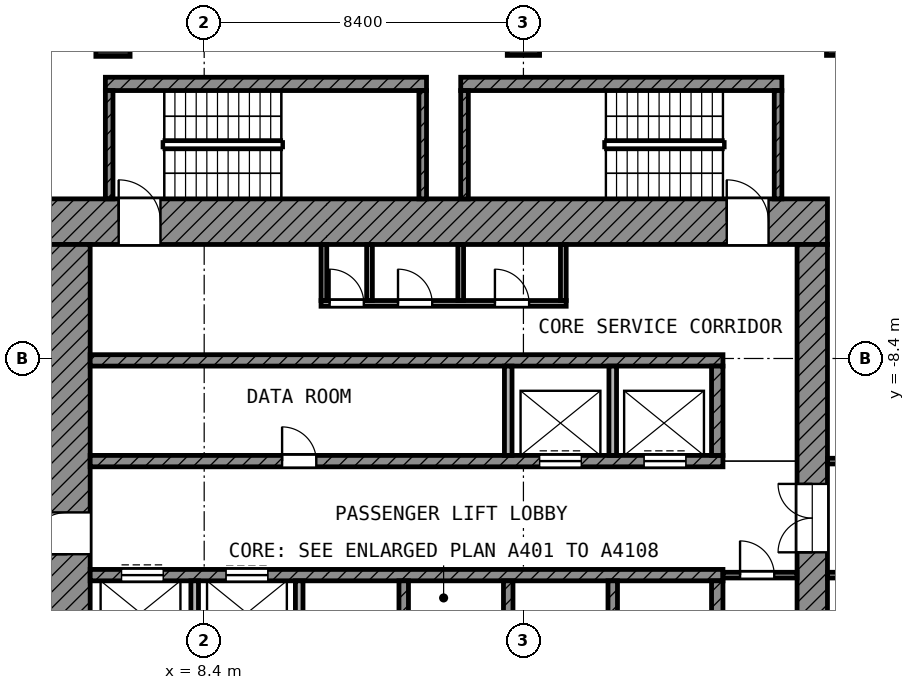
"""IFC4 building model, lengths in metres.
Left out: names, types, materials, properties, quantities, classifications, styles, units other than length and angle.
Written with IfcOpenShell. Run it as: python <this file> out.ifc"""

import sys

from ifc_helpers import new_model, si_unit, direction, frame, frame_2d, origin, origin_2d, place, context, subcontext, project, spatial, rectangle, extrude, element, fill, save


model = new_model("IFC4")
c1 = context("Model", 3, precision=1e-05, world=origin(), true_north=direction((0.0, 1.0)))
c2 = subcontext(c1, "Body", "Model", "MODEL_VIEW")
j1 = project(units=[si_unit("LENGTHUNIT", "METRE"), si_unit("PLANEANGLEUNIT", "RADIAN")], contexts=[c1])
p1 = place(None, origin())
s1 = spatial("IfcSite", under=j1, at=p1, CompositionType="ELEMENT")
p2 = place(p1, origin())
s2 = spatial("IfcBuilding", under=s1, at=p2, CompositionType="ELEMENT")
p3 = place(p2, frame((0.0, 0.0, 264.2)))
s3 = spatial("IfcBuildingStorey", under=s2, at=p3, CompositionType="ELEMENT", Elevation=264.2)
p4 = place(p3, frame((6.0, 0.0, 0.0), z_axis=(0.0, 0.0, 1.0), x_axis=(1.0, 0.0, 0.0)))
e1 = element("IfcColumn", 1, at=p4, inside=s3, PredefinedType="COLUMN", context=c2, shape_type="SweptSolid", body=[
    extrude(rectangle(XDim=0.9, YDim=0.9, at=origin_2d()), origin(), (0.0, 0.0, 1.0), 4.2),
])
for number, where, z_axis, x_axis in (
    (2, (16.8, 0.0, 0.0), (0.0, 0.0, 1.0), (1.0, 0.0, 0.0)),
    (3, (25.2, 0.0, 0.0), (0.0, 0.0, 1.0), (1.0, 0.0, 0.0)),
):
    element("IfcColumn", number, at=place(p3, frame(where, z_axis=z_axis, x_axis=x_axis)), inside=s3, PredefinedType="COLUMN", context=c2, shape_type="SweptSolid", body=[
        extrude(rectangle(XDim=0.85, YDim=0.85, at=origin_2d()), origin(), (0.0, 0.0, 1.0), 4.2),
    ])
p5 = place(p3, frame((4.2, -4.8, 0.0), z_axis=(0.0, 0.0, 1.0), x_axis=(1.0, 0.0, 0.0)))
e4 = element("IfcWall", 4, at=p5, inside=s3, PredefinedType="SHEAR", context=c2, shape_type="SweptSolid", body=[
    extrude(rectangle(XDim=20.6, YDim=1.2, at=frame_2d((10.3, 0.0))), origin(), (0.0, 0.0, 1.0), 3.6),
])
p6 = place(p5, frame((1.95, 0.0, 0.0)))
e5 = element("IfcOpeningElement", 5, at=p6, cuts=e4, PredefinedType="OPENING", context=c2, shape_type="SweptSolid", body=[
    extrude(rectangle(XDim=1.1, YDim=2.1, at=frame_2d((0.55, 1.05))), frame((0.0, 0.61, 0.0), z_axis=(0.0, -1.0, 0.0), x_axis=(1.0, 0.0, 0.0)), (0.0, 0.0, 1.0), 1.22),
])
p7 = place(p5, frame((17.95, 0.0, 0.0)))
e6 = element("IfcOpeningElement", 6, at=p7, cuts=e4, PredefinedType="OPENING", context=c2, shape_type="SweptSolid", body=[
    extrude(rectangle(XDim=1.1, YDim=2.1, at=frame_2d((0.55, 1.05))), frame((0.0, 0.61, 0.0), z_axis=(0.0, -1.0, 0.0), x_axis=(1.0, 0.0, 0.0)), (0.0, 0.0, 1.0), 1.22),
])
p8 = place(p3, frame((4.8, -24.8, 0.0), z_axis=(0.0, 0.0, 1.0), x_axis=(0.0, 1.0, 0.0)))
e7 = element("IfcWall", 7, at=p8, inside=s3, PredefinedType="SHEAR", context=c2, shape_type="SweptSolid", body=[
    extrude(rectangle(XDim=19.4, YDim=1.2, at=frame_2d((9.7, 0.0))), origin(), (0.0, 0.0, 1.0), 3.6),
])
p9 = place(p8, frame((11.25, 0.0, 0.0)))
e8 = element("IfcOpeningElement", 8, at=p9, cuts=e7, PredefinedType="OPENING", context=c2, shape_type="SweptSolid", body=[
    extrude(rectangle(XDim=1.1, YDim=2.1, at=frame_2d((0.55, 1.05))), frame((0.0, 0.61, 0.0), z_axis=(0.0, -1.0, 0.0), x_axis=(1.0, 0.0, 0.0)), (0.0, 0.0, 1.0), 1.22),
])
p10 = place(p8, frame((1.95, 0.0, 0.0)))
e9 = element("IfcOpeningElement", 9, at=p10, cuts=e7, PredefinedType="OPENING", context=c2, shape_type="SweptSolid", body=[
    extrude(rectangle(XDim=1.1, YDim=2.1, at=frame_2d((0.55, 1.05))), frame((0.0, 0.61, 0.0), z_axis=(0.0, -1.0, 0.0), x_axis=(1.0, 0.0, 0.0)), (0.0, 0.0, 1.0), 1.22),
])
p11 = place(p3, frame((24.4, -24.0, 0.0), z_axis=(0.0, 0.0, 1.0), x_axis=(0.0, 1.0, 0.0)))
e10 = element("IfcWall", 10, at=p11, inside=s3, PredefinedType="SHEAR", context=c2, shape_type="SweptSolid", body=[
    extrude(rectangle(XDim=18.6, YDim=0.8, at=frame_2d((9.3, 0.0))), origin(), (0.0, 0.0, 1.0), 3.6),
])
p12 = place(p11, frame((10.5, 0.0, 0.0)))
e11 = element("IfcOpeningElement", 11, at=p12, cuts=e10, PredefinedType="OPENING", context=c2, shape_type="SweptSolid", body=[
    extrude(rectangle(XDim=1.8, YDim=2.1, at=frame_2d((0.9, 1.05))), frame((0.0, 0.41, 0.0), z_axis=(0.0, -1.0, 0.0), x_axis=(1.0, 0.0, 0.0)), (0.0, 0.0, 1.0), 0.82),
])
p13 = place(p3, frame((5.4, -8.45, 0.0), z_axis=(0.0, 0.0, 1.0), x_axis=(1.0, 0.0, 0.0)))
e12 = element("IfcWall", 12, at=p13, inside=s3, PredefinedType="SHEAR", context=c2, shape_type="SweptSolid", body=[
    extrude(rectangle(XDim=16.65, YDim=0.3, at=frame_2d((8.325, 0.0))), origin(), (0.0, 0.0, 1.0), 3.6),
])
p14 = place(p3, frame((5.4, -11.1, 0.0), z_axis=(0.0, 0.0, 1.0), x_axis=(1.0, 0.0, 0.0)))
e13 = element("IfcWall", 13, at=p14, inside=s3, PredefinedType="SHEAR", context=c2, shape_type="SweptSolid", body=[
    extrude(rectangle(XDim=16.65, YDim=0.3, at=frame_2d((8.325, 0.0))), origin(), (0.0, 0.0, 1.0), 3.6),
])
p15 = place(p14, frame((11.825, 0.0, 0.0)))
e14 = element("IfcOpeningElement", 14, at=p15, cuts=e13, PredefinedType="OPENING", context=c2, shape_type="SweptSolid", body=[
    extrude(rectangle(XDim=1.1, YDim=2.1, at=frame_2d((0.55, 1.05))), frame((0.0, 0.16, 0.0), z_axis=(0.0, -1.0, 0.0), x_axis=(1.0, 0.0, 0.0)), (0.0, 0.0, 1.0), 0.32),
])
p16 = place(p14, frame((14.575, 0.0, 0.0)))
e15 = element("IfcOpeningElement", 15, at=p16, cuts=e13, PredefinedType="OPENING", context=c2, shape_type="SweptSolid", body=[
    extrude(rectangle(XDim=1.1, YDim=2.1, at=frame_2d((0.55, 1.05))), frame((0.0, 0.16, 0.0), z_axis=(0.0, -1.0, 0.0), x_axis=(1.0, 0.0, 0.0)), (0.0, 0.0, 1.0), 0.32),
])
p17 = place(p14, frame((5.05, 0.0, 0.0)))
e16 = element("IfcOpeningElement", 16, at=p17, cuts=e13, PredefinedType="OPENING", context=c2, shape_type="SweptSolid", body=[
    extrude(rectangle(XDim=0.9, YDim=2.1, at=frame_2d((0.45, 1.05))), frame((0.0, 0.16, 0.0), z_axis=(0.0, -1.0, 0.0), x_axis=(1.0, 0.0, 0.0)), (0.0, 0.0, 1.0), 0.32),
])
p18 = place(p3, frame((5.4, -14.1, 0.0), z_axis=(0.0, 0.0, 1.0), x_axis=(1.0, 0.0, 0.0)))
e17 = element("IfcWall", 17, at=p18, inside=s3, PredefinedType="SHEAR", context=c2, shape_type="SweptSolid", body=[
    extrude(rectangle(XDim=16.65, YDim=0.3, at=frame_2d((8.325, 0.0))), origin(), (0.0, 0.0, 1.0), 3.6),
])
p19 = place(p18, frame((0.825, 0.0, 0.0)))
e18 = element("IfcOpeningElement", 18, at=p19, cuts=e17, PredefinedType="OPENING", context=c2, shape_type="SweptSolid", body=[
    extrude(rectangle(XDim=1.1, YDim=2.1, at=frame_2d((0.55, 1.05))), frame((0.0, 0.16, 0.0), z_axis=(0.0, -1.0, 0.0), x_axis=(1.0, 0.0, 0.0)), (0.0, 0.0, 1.0), 0.32),
])
p20 = place(p18, frame((3.575, 0.0, 0.0)))
e19 = element("IfcOpeningElement", 19, at=p20, cuts=e17, PredefinedType="OPENING", context=c2, shape_type="SweptSolid", body=[
    extrude(rectangle(XDim=1.1, YDim=2.1, at=frame_2d((0.55, 1.05))), frame((0.0, 0.16, 0.0), z_axis=(0.0, -1.0, 0.0), x_axis=(1.0, 0.0, 0.0)), (0.0, 0.0, 1.0), 0.32),
])
p21 = place(p3, frame((21.9, -10.95, 0.0), z_axis=(0.0, 0.0, 1.0), x_axis=(0.0, 1.0, 0.0)))
e20 = element("IfcWall", 20, at=p21, inside=s3, PredefinedType="SHEAR", context=c2, shape_type="SweptSolid", body=[
    extrude(rectangle(XDim=2.35, YDim=0.3, at=frame_2d((1.175, 0.0))), origin(), (0.0, 0.0, 1.0), 3.6),
])
p22 = place(p3, frame((21.9, -16.6, 0.0), z_axis=(0.0, 0.0, 1.0), x_axis=(0.0, 1.0, 0.0)))
e21 = element("IfcWall", 21, at=p22, inside=s3, PredefinedType="SHEAR", context=c2, shape_type="SweptSolid", body=[
    extrude(rectangle(XDim=2.35, YDim=0.3, at=frame_2d((1.175, 0.0))), origin(), (0.0, 0.0, 1.0), 3.6),
])
for number, where, z_axis, x_axis in (
    (22, (16.4, -10.95, 0.0), (0.0, 0.0, 1.0), (0.0, 1.0, 0.0)),
    (23, (19.15, -10.95, 0.0), (0.0, 0.0, 1.0), (0.0, 1.0, 0.0)),
):
    element("IfcWall", number, at=place(p3, frame(where, z_axis=z_axis, x_axis=x_axis)), inside=s3, PredefinedType="PARTITIONING", context=c2, shape_type="SweptSolid", body=[
        extrude(rectangle(XDim=2.35, YDim=0.2, at=frame_2d((1.175, 0.0))), origin(), (0.0, 0.0, 1.0), 3.6),
    ])
for number, where, z_axis, x_axis in (
    (24, (8.15, -16.6, 0.0), (0.0, 0.0, 1.0), (0.0, 1.0, 0.0)),
    (25, (10.9, -16.6, 0.0), (0.0, 0.0, 1.0), (0.0, 1.0, 0.0)),
):
    element("IfcWall", number, at=place(p3, frame(where, z_axis=z_axis, x_axis=x_axis)), inside=s3, PredefinedType="PARTITIONING", context=c2, shape_type="SweptSolid", body=[
        extrude(rectangle(XDim=2.35, YDim=0.2, at=frame_2d((1.175, 0.0))), origin(), (0.0, 0.0, 1.0), 3.6),
    ])
for number, where, z_axis, x_axis in (
    (26, (13.65, -16.6, 0.0), (0.0, 0.0, 1.0), (0.0, 1.0, 0.0)),
    (27, (16.4, -16.6, 0.0), (0.0, 0.0, 1.0), (0.0, 1.0, 0.0)),
    (28, (19.15, -16.6, 0.0), (0.0, 0.0, 1.0), (0.0, 1.0, 0.0)),
):
    element("IfcWall", number, at=place(p3, frame(where, z_axis=z_axis, x_axis=x_axis)), inside=s3, PredefinedType="SHEAR", context=c2, shape_type="SweptSolid", body=[
        extrude(rectangle(XDim=2.35, YDim=0.25, at=frame_2d((1.175, 0.0))), origin(), (0.0, 0.0, 1.0), 3.6),
    ])
p23 = place(p3, frame((22.05, -14.1, 0.0), z_axis=(0.0, 0.0, 1.0), x_axis=(1.0, 0.0, 0.0)))
e29 = element("IfcWall", 29, at=p23, inside=s3, PredefinedType="PARTITIONING", context=c2, shape_type="SweptSolid", body=[
    extrude(rectangle(XDim=1.95, YDim=0.15, at=frame_2d((0.975, 0.0))), origin(), (0.0, 0.0, 1.0), 3.6),
])
p24 = place(p23, frame((0.45, 0.0, 0.0)))
e30 = element("IfcOpeningElement", 30, at=p24, cuts=e29, PredefinedType="OPENING", context=c2, shape_type="SweptSolid", body=[
    extrude(rectangle(XDim=0.9, YDim=2.1, at=frame_2d((0.45, 1.05))), frame((0.0, 0.085, 0.0), z_axis=(0.0, -1.0, 0.0), x_axis=(1.0, 0.0, 0.0)), (0.0, 0.0, 1.0), 0.17),
])
p25 = place(p3, frame((11.475, -6.95, 0.0), z_axis=(0.0, 0.0, 1.0), x_axis=(1.0, 0.0, 0.0)))
e31 = element("IfcWall", 31, at=p25, inside=s3, PredefinedType="PARTITIONING", context=c2, shape_type="SweptSolid", body=[
    extrude(rectangle(XDim=6.45, YDim=0.15, at=frame_2d((3.225, 0.0))), origin(), (0.0, 0.0, 1.0), 3.6),
])
p26 = place(p25, frame((0.225, 0.0, 0.0)))
e32 = element("IfcOpeningElement", 32, at=p26, cuts=e31, PredefinedType="OPENING", context=c2, shape_type="SweptSolid", body=[
    extrude(rectangle(XDim=0.9, YDim=2.1, at=frame_2d((0.45, 1.05))), frame((0.0, 0.085, 0.0), z_axis=(0.0, -1.0, 0.0), x_axis=(1.0, 0.0, 0.0)), (0.0, 0.0, 1.0), 0.17),
])
p27 = place(p25, frame((2.025, 0.0, 0.0)))
e33 = element("IfcOpeningElement", 33, at=p27, cuts=e31, PredefinedType="OPENING", context=c2, shape_type="SweptSolid", body=[
    extrude(rectangle(XDim=0.9, YDim=2.1, at=frame_2d((0.45, 1.05))), frame((0.0, 0.085, 0.0), z_axis=(0.0, -1.0, 0.0), x_axis=(1.0, 0.0, 0.0)), (0.0, 0.0, 1.0), 0.17),
])
p28 = place(p25, frame((4.575, 0.0, 0.0)))
e34 = element("IfcOpeningElement", 34, at=p28, cuts=e31, PredefinedType="OPENING", context=c2, shape_type="SweptSolid", body=[
    extrude(rectangle(XDim=0.9, YDim=2.1, at=frame_2d((0.45, 1.05))), frame((0.0, 0.085, 0.0), z_axis=(0.0, -1.0, 0.0), x_axis=(1.0, 0.0, 0.0)), (0.0, 0.0, 1.0), 0.17),
])
for number, where, z_axis, x_axis in (
    (35, (11.55, -6.875, 0.0), (0.0, 0.0, 1.0), (0.0, 1.0, 0.0)),
    (36, (12.75, -6.875, 0.0), (0.0, 0.0, 1.0), (0.0, 1.0, 0.0)),
    (37, (15.15, -6.875, 0.0), (0.0, 0.0, 1.0), (0.0, 1.0, 0.0)),
    (38, (17.85, -6.875, 0.0), (0.0, 0.0, 1.0), (0.0, 1.0, 0.0)),
):
    element("IfcWall", number, at=place(p3, frame(where, z_axis=z_axis, x_axis=x_axis)), inside=s3, PredefinedType="PARTITIONING", context=c2, shape_type="SweptSolid", body=[
        extrude(rectangle(XDim=1.475, YDim=0.15, at=frame_2d((0.738, 0.0))), origin(), (0.0, 0.0, 1.0), 3.6),
    ])
p29 = place(p3, frame((5.8, -1.175, 0.0), z_axis=(0.0, 0.0, 1.0), x_axis=(1.0, 0.0, 0.0)))
e39 = element("IfcWall", 39, at=p29, inside=s3, PredefinedType="SHEAR", context=c2, shape_type="SweptSolid", body=[
    extrude(rectangle(XDim=8.45, YDim=0.35, at=frame_2d((4.225, 0.0))), origin(), (0.0, 0.0, 1.0), 3.6),
])
for number, where, z_axis, x_axis in (
    (40, (5.9, -4.2, 0.0), (0.0, 0.0, 1.0), (0.0, 1.0, 0.0)),
    (41, (14.15, -4.2, 0.0), (0.0, 0.0, 1.0), (0.0, 1.0, 0.0)),
):
    element("IfcWall", number, at=place(p3, frame(where, z_axis=z_axis, x_axis=x_axis)), inside=s3, PredefinedType="SHEAR", context=c2, shape_type="SweptSolid", body=[
        extrude(rectangle(XDim=2.85, YDim=0.2, at=frame_2d((1.425, 0.0))), origin(), (0.0, 0.0, 1.0), 3.6),
    ])
p30 = place(p3, frame((15.15, -1.175, 0.0), z_axis=(0.0, 0.0, 1.0), x_axis=(1.0, 0.0, 0.0)))
e42 = element("IfcWall", 42, at=p30, inside=s3, PredefinedType="SHEAR", context=c2, shape_type="SweptSolid", body=[
    extrude(rectangle(XDim=8.45, YDim=0.35, at=frame_2d((4.225, 0.0))), origin(), (0.0, 0.0, 1.0), 3.6),
])
for number, where, z_axis, x_axis in (
    (43, (15.25, -4.2, 0.0), (0.0, 0.0, 1.0), (0.0, 1.0, 0.0)),
    (44, (23.5, -4.2, 0.0), (0.0, 0.0, 1.0), (0.0, 1.0, 0.0)),
):
    element("IfcWall", number, at=place(p3, frame(where, z_axis=z_axis, x_axis=x_axis)), inside=s3, PredefinedType="SHEAR", context=c2, shape_type="SweptSolid", body=[
        extrude(rectangle(XDim=2.85, YDim=0.2, at=frame_2d((1.425, 0.0))), origin(), (0.0, 0.0, 1.0), 3.6),
    ])
p31 = place(p3, frame((24.8, -14.1, 0.0), z_axis=(0.0, 0.0, 1.0), x_axis=(1.0, 0.0, 0.0)))
e45 = element("IfcWall", 45, at=p31, inside=s3, PredefinedType="PARTITIONING", context=c2, shape_type="SweptSolid", body=[
    extrude(rectangle(XDim=4.525, YDim=0.15, at=frame_2d((2.262, 0.0))), origin(), (0.0, 0.0, 1.0), 3.6),
])
p32 = place(p31, frame((1.75, 0.0, 0.0)))
e46 = element("IfcOpeningElement", 46, at=p32, cuts=e45, PredefinedType="OPENING", context=c2, shape_type="SweptSolid", body=[
    extrude(rectangle(XDim=1.5, YDim=2.1, at=frame_2d((0.75, 1.05))), frame((0.0, 0.085, 0.0), z_axis=(0.0, -1.0, 0.0), x_axis=(1.0, 0.0, 0.0)), (0.0, 0.0, 1.0), 0.17),
])
p33 = place(p3, frame((24.8, -11.1, 0.0), z_axis=(0.0, 0.0, 1.0), x_axis=(1.0, 0.0, 0.0)))
e47 = element("IfcWall", 47, at=p33, inside=s3, PredefinedType="PARTITIONING", context=c2, shape_type="SweptSolid", body=[
    extrude(rectangle(XDim=4.6, YDim=0.15, at=frame_2d((2.3, 0.0))), origin(), (0.0, 0.0, 1.0), 3.6),
])
p34 = place(p33, frame((1.85, 0.0, 0.0)))
e48 = element("IfcOpeningElement", 48, at=p34, cuts=e47, PredefinedType="OPENING", context=c2, shape_type="SweptSolid", body=[
    extrude(rectangle(XDim=1.0, YDim=2.1, at=frame_2d((0.5, 1.05))), frame((0.0, 0.085, 0.0), z_axis=(0.0, -1.0, 0.0), x_axis=(1.0, 0.0, 0.0)), (0.0, 0.0, 1.0), 0.17),
])
p35 = place(p15, origin())
e49 = element("IfcDoor", 49, at=p35, inside=s3, OperationType="DOUBLE_DOOR_SLIDING", PredefinedType="DOOR", context=c2, shape_type="SweptSolid", body=[
    extrude(rectangle(XDim=1.1, YDim=2.1, at=frame_2d((0.55, 1.05))), frame((0.0, 0.025, 0.0), z_axis=(0.0, -1.0, 0.0), x_axis=(1.0, 0.0, 0.0)), (0.0, 0.0, 1.0), 0.05),
])
fill(e14, e49)
p36 = place(p16, origin())
e50 = element("IfcDoor", 50, at=p36, inside=s3, OperationType="DOUBLE_DOOR_SLIDING", PredefinedType="DOOR", context=c2, shape_type="SweptSolid", body=[
    extrude(rectangle(XDim=1.1, YDim=2.1, at=frame_2d((0.55, 1.05))), frame((0.0, 0.025, 0.0), z_axis=(0.0, -1.0, 0.0), x_axis=(1.0, 0.0, 0.0)), (0.0, 0.0, 1.0), 0.05),
])
fill(e15, e50)
p37 = place(p19, origin())
e51 = element("IfcDoor", 51, at=p37, inside=s3, OperationType="DOUBLE_DOOR_SLIDING", PredefinedType="DOOR", context=c2, shape_type="SweptSolid", body=[
    extrude(rectangle(XDim=1.1, YDim=2.1, at=frame_2d((0.55, 1.05))), frame((0.0, 0.025, 0.0), z_axis=(0.0, -1.0, 0.0), x_axis=(1.0, 0.0, 0.0)), (0.0, 0.0, 1.0), 0.05),
])
fill(e18, e51)
p38 = place(p20, origin())
e52 = element("IfcDoor", 52, at=p38, inside=s3, OperationType="DOUBLE_DOOR_SLIDING", PredefinedType="DOOR", context=c2, shape_type="SweptSolid", body=[
    extrude(rectangle(XDim=1.1, YDim=2.1, at=frame_2d((0.55, 1.05))), frame((0.0, 0.025, 0.0), z_axis=(0.0, -1.0, 0.0), x_axis=(1.0, 0.0, 0.0)), (0.0, 0.0, 1.0), 0.05),
])
fill(e19, e52)
p39 = place(p9, origin())
e53 = element("IfcDoor", 53, at=p39, inside=s3, OperationType="SINGLE_SWING_LEFT", PredefinedType="DOOR", context=c2, shape_type="SweptSolid", body=[
    extrude(rectangle(XDim=1.1, YDim=2.1, at=frame_2d((0.55, 1.05))), frame((0.0, 0.025, 0.0), z_axis=(0.0, -1.0, 0.0), x_axis=(1.0, 0.0, 0.0)), (0.0, 0.0, 1.0), 0.05),
])
fill(e8, e53)
p40 = place(p6, origin())
e54 = element("IfcDoor", 54, at=p40, inside=s3, OperationType="SINGLE_SWING_LEFT", PredefinedType="DOOR", context=c2, shape_type="SweptSolid", body=[
    extrude(rectangle(XDim=1.1, YDim=2.1, at=frame_2d((0.55, 1.05))), frame((0.0, 0.025, 0.0), z_axis=(0.0, -1.0, 0.0), x_axis=(1.0, 0.0, 0.0)), (0.0, 0.0, 1.0), 0.05),
])
fill(e5, e54)
p41 = place(p7, origin())
e55 = element("IfcDoor", 55, at=p41, inside=s3, OperationType="SINGLE_SWING_LEFT", PredefinedType="DOOR", context=c2, shape_type="SweptSolid", body=[
    extrude(rectangle(XDim=1.1, YDim=2.1, at=frame_2d((0.55, 1.05))), frame((0.0, 0.025, 0.0), z_axis=(0.0, -1.0, 0.0), x_axis=(1.0, 0.0, 0.0)), (0.0, 0.0, 1.0), 0.05),
])
fill(e6, e55)
p42 = place(p12, origin())
e56 = element("IfcDoor", 56, at=p42, inside=s3, OperationType="DOUBLE_DOOR_SINGLE_SWING", PredefinedType="DOOR", context=c2, shape_type="SweptSolid", body=[
    extrude(rectangle(XDim=1.8, YDim=2.1, at=frame_2d((0.9, 1.05))), frame((0.0, 0.025, 0.0), z_axis=(0.0, -1.0, 0.0), x_axis=(1.0, 0.0, 0.0)), (0.0, 0.0, 1.0), 0.05),
])
fill(e11, e56)
p43 = place(p26, origin())
e57 = element("IfcDoor", 57, at=p43, inside=s3, OperationType="SINGLE_SWING_LEFT", PredefinedType="DOOR", context=c2, shape_type="SweptSolid", body=[
    extrude(rectangle(XDim=0.9, YDim=2.1, at=frame_2d((0.45, 1.05))), frame((0.0, 0.025, 0.0), z_axis=(0.0, -1.0, 0.0), x_axis=(1.0, 0.0, 0.0)), (0.0, 0.0, 1.0), 0.05),
])
fill(e32, e57)
p44 = place(p27, origin())
e58 = element("IfcDoor", 58, at=p44, inside=s3, OperationType="SINGLE_SWING_LEFT", PredefinedType="DOOR", context=c2, shape_type="SweptSolid", body=[
    extrude(rectangle(XDim=0.9, YDim=2.1, at=frame_2d((0.45, 1.05))), frame((0.0, 0.025, 0.0), z_axis=(0.0, -1.0, 0.0), x_axis=(1.0, 0.0, 0.0)), (0.0, 0.0, 1.0), 0.05),
])
fill(e33, e58)
p45 = place(p28, origin())
e59 = element("IfcDoor", 59, at=p45, inside=s3, OperationType="SINGLE_SWING_LEFT", PredefinedType="DOOR", context=c2, shape_type="SweptSolid", body=[
    extrude(rectangle(XDim=0.9, YDim=2.1, at=frame_2d((0.45, 1.05))), frame((0.0, 0.025, 0.0), z_axis=(0.0, -1.0, 0.0), x_axis=(1.0, 0.0, 0.0)), (0.0, 0.0, 1.0), 0.05),
])
fill(e34, e59)
p46 = place(p24, origin())
e60 = element("IfcDoor", 60, at=p46, inside=s3, OperationType="SINGLE_SWING_LEFT", PredefinedType="DOOR", context=c2, shape_type="SweptSolid", body=[
    extrude(rectangle(XDim=0.9, YDim=2.1, at=frame_2d((0.45, 1.05))), frame((0.0, 0.025, 0.0), z_axis=(0.0, -1.0, 0.0), x_axis=(1.0, 0.0, 0.0)), (0.0, 0.0, 1.0), 0.05),
])
fill(e30, e60)
p47 = place(p17, origin())
e61 = element("IfcDoor", 61, at=p47, inside=s3, OperationType="SINGLE_SWING_LEFT", PredefinedType="DOOR", context=c2, shape_type="SweptSolid", body=[
    extrude(rectangle(XDim=0.9, YDim=2.1, at=frame_2d((0.45, 1.05))), frame((0.0, 0.025, 0.0), z_axis=(0.0, -1.0, 0.0), x_axis=(1.0, 0.0, 0.0)), (0.0, 0.0, 1.0), 0.05),
])
fill(e16, e61)
save(model, sys.argv[1])
